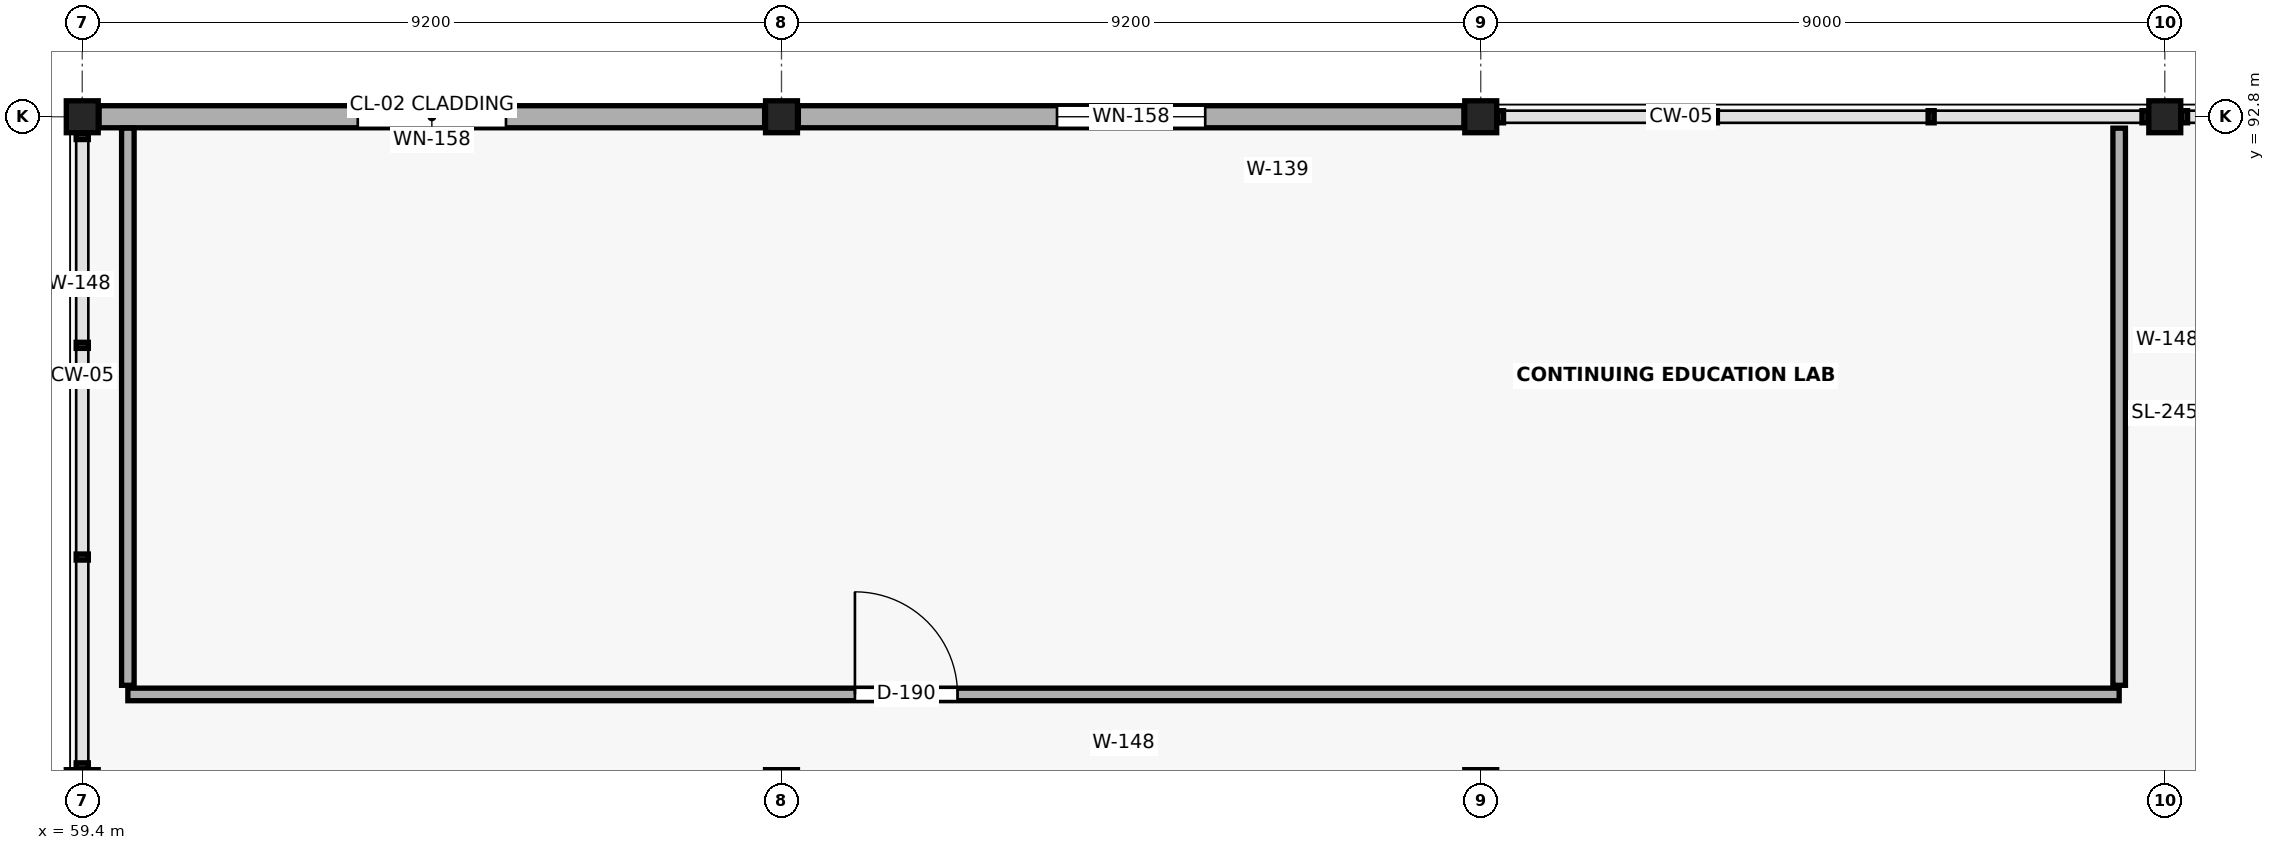
"""IFC4 building model, lengths in metres.
Left out: names, types, materials, properties, quantities, classifications, styles, units other than length and angle.
Written with IfcOpenShell. Run it as: python <this file> out.ifc"""

import sys

from ifc_helpers import new_model, si_unit, direction, frame, frame_2d, origin, origin_2d, place, context, subcontext, project, spatial, rectangle, extrude, element, fill, save


model = new_model("IFC4")
c1 = context("Model", 3, precision=1e-05, world=origin(), true_north=direction((0.0, 1.0)))
c2 = subcontext(c1, "Body", "Model", "MODEL_VIEW")
j1 = project(units=[si_unit("LENGTHUNIT", "METRE"), si_unit("PLANEANGLEUNIT", "RADIAN")], contexts=[c1])
p1 = place(None, origin())
s1 = spatial("IfcSite", under=j1, at=p1, CompositionType="ELEMENT")
p2 = place(p1, origin())
s2 = spatial("IfcBuilding", under=s1, at=p2, CompositionType="ELEMENT")
p3 = place(p2, frame((0.0, 0.0, 18.3)))
s3 = spatial("IfcBuildingStorey", under=s2, at=p3, CompositionType="ELEMENT", Elevation=18.3)
for number, where, z_axis, x_axis in (
    (1, (59.4, 84.0, 0.0), (0.0, 0.0, 1.0), (1.0, 0.0, 0.0)),
    (2, (59.4, 92.8, 0.0), (0.0, 0.0, 1.0), (1.0, 0.0, 0.0)),
    (3, (68.6, 84.0, 0.0), (0.0, 0.0, 1.0), (1.0, 0.0, 0.0)),
    (4, (68.6, 92.8, 0.0), (0.0, 0.0, 1.0), (1.0, 0.0, 0.0)),
    (5, (77.8, 84.0, 0.0), (0.0, 0.0, 1.0), (1.0, 0.0, 0.0)),
    (6, (77.8, 92.8, 0.0), (0.0, 0.0, 1.0), (1.0, 0.0, 0.0)),
    (7, (86.8, 92.8, 0.0), (0.0, 0.0, 1.0), (1.0, 0.0, 0.0)),
):
    element("IfcColumn", number, at=place(p3, frame(where, z_axis=z_axis, x_axis=x_axis)), inside=s3, PredefinedType="COLUMN", context=c2, shape_type="SweptSolid", body=[
        extrude(rectangle(XDim=0.42, YDim=0.42, at=origin_2d()), origin(), (0.0, 0.0, 1.0), 3.9),
    ])
p4 = place(p3, frame((59.622, 92.8, 0.0), z_axis=(0.0, 0.0, 1.0), x_axis=(1.0, 0.0, 0.0)))
e8 = element("IfcWall", 8, at=p4, inside=s3, PredefinedType="SOLIDWALL", context=c2, shape_type="SweptSolid", body=[
    extrude(rectangle(XDim=8.756, YDim=0.29, at=frame_2d((4.378, 0.0))), origin(), (0.0, 0.0, 1.0), 2.855),
])
p5 = place(p4, frame((3.403, 0.0, 0.85)))
e9 = element("IfcOpeningElement", 9, at=p5, cuts=e8, PredefinedType="OPENING", context=c2, shape_type="SweptSolid", body=[
    extrude(rectangle(XDim=1.95, YDim=1.9, at=frame_2d((0.975, 0.95))), frame((0.0, 0.157, 0.0), z_axis=(0.0, -1.0, 0.0), x_axis=(1.0, 0.0, 0.0)), (0.0, 0.0, 1.0), 0.314),
])
p6 = place(p3, frame((68.822, 92.8, 0.0), z_axis=(0.0, 0.0, 1.0), x_axis=(1.0, 0.0, 0.0)))
e10 = element("IfcWall", 10, at=p6, inside=s3, PredefinedType="SOLIDWALL", context=c2, shape_type="SweptSolid", body=[
    extrude(rectangle(XDim=8.756, YDim=0.29, at=frame_2d((4.378, 0.0))), origin(), (0.0, 0.0, 1.0), 2.855),
])
p7 = place(p6, frame((3.403, 0.0, 0.85)))
e11 = element("IfcOpeningElement", 11, at=p7, cuts=e10, PredefinedType="OPENING", context=c2, shape_type="SweptSolid", body=[
    extrude(rectangle(XDim=1.95, YDim=1.9, at=frame_2d((0.975, 0.95))), frame((0.0, 0.157, 0.0), z_axis=(0.0, -1.0, 0.0), x_axis=(1.0, 0.0, 0.0)), (0.0, 0.0, 1.0), 0.314),
])
p8 = place(p3, frame((60.0, 85.2, 0.0), z_axis=(0.0, 0.0, 1.0), x_axis=(1.0, 0.0, 0.0)))
e12 = element("IfcWall", 12, at=p8, inside=s3, PredefinedType="PARTITIONING", context=c2, shape_type="SweptSolid", body=[
    extrude(rectangle(XDim=26.2, YDim=0.165, at=frame_2d((13.1, 0.0))), origin(), (0.0, 0.0, 1.0), 3.655),
])
p9 = place(p8, frame((9.566, 0.0, 0.0)))
e13 = element("IfcOpeningElement", 13, at=p9, cuts=e12, PredefinedType="OPENING", context=c2, shape_type="SweptSolid", body=[
    extrude(rectangle(XDim=1.35, YDim=2.35, at=frame_2d((0.675, 1.175))), frame((0.0, 0.094, 0.0), z_axis=(0.0, -1.0, 0.0), x_axis=(1.0, 0.0, 0.0)), (0.0, 0.0, 1.0), 0.189),
])
for number, where, z_axis, x_axis in (
    (14, (86.2, 85.32, 0.0), (0.0, 0.0, 1.0), (0.0, 1.0, 0.0)),
    (15, (60.0, 92.65, 0.0), (0.0, 0.0, 1.0), (0.0, -1.0, 0.0)),
):
    element("IfcWall", number, at=place(p3, frame(where, z_axis=z_axis, x_axis=x_axis)), inside=s3, PredefinedType="PARTITIONING", context=c2, shape_type="SweptSolid", body=[
        extrude(rectangle(XDim=7.33, YDim=0.165, at=frame_2d((3.665, 0.0))), origin(), (0.0, 0.0, 1.0), 3.655),
    ])
p10 = place(p5, origin())
e16 = element("IfcWindow", 16, at=p10, inside=s3, PartitioningType="SINGLE_PANEL", PredefinedType="WINDOW", context=c2, shape_type="SweptSolid", body=[
    extrude(rectangle(XDim=1.95, YDim=1.9, at=frame_2d((0.975, 0.95))), frame((0.0, 0.03, 0.0), z_axis=(0.0, -1.0, 0.0), x_axis=(1.0, 0.0, 0.0)), (0.0, 0.0, 1.0), 0.06),
])
fill(e9, e16)
p11 = place(p7, origin())
e17 = element("IfcWindow", 17, at=p11, inside=s3, PartitioningType="SINGLE_PANEL", PredefinedType="WINDOW", context=c2, shape_type="SweptSolid", body=[
    extrude(rectangle(XDim=1.95, YDim=1.9, at=frame_2d((0.975, 0.95))), frame((0.0, 0.03, 0.0), z_axis=(0.0, -1.0, 0.0), x_axis=(1.0, 0.0, 0.0)), (0.0, 0.0, 1.0), 0.06),
])
fill(e11, e17)
p12 = place(p9, origin())
e18 = element("IfcDoor", 18, at=p12, inside=s3, OperationType="SINGLE_SWING_LEFT", PredefinedType="DOOR", context=c2, shape_type="SweptSolid", body=[
    extrude(rectangle(XDim=1.35, YDim=2.35, at=frame_2d((0.675, 1.175))), frame((0.0, 0.025, 0.0), z_axis=(0.0, -1.0, 0.0), x_axis=(1.0, 0.0, 0.0)), (0.0, 0.0, 1.0), 0.05),
])
fill(e13, e18)
save(model, sys.argv[1])
